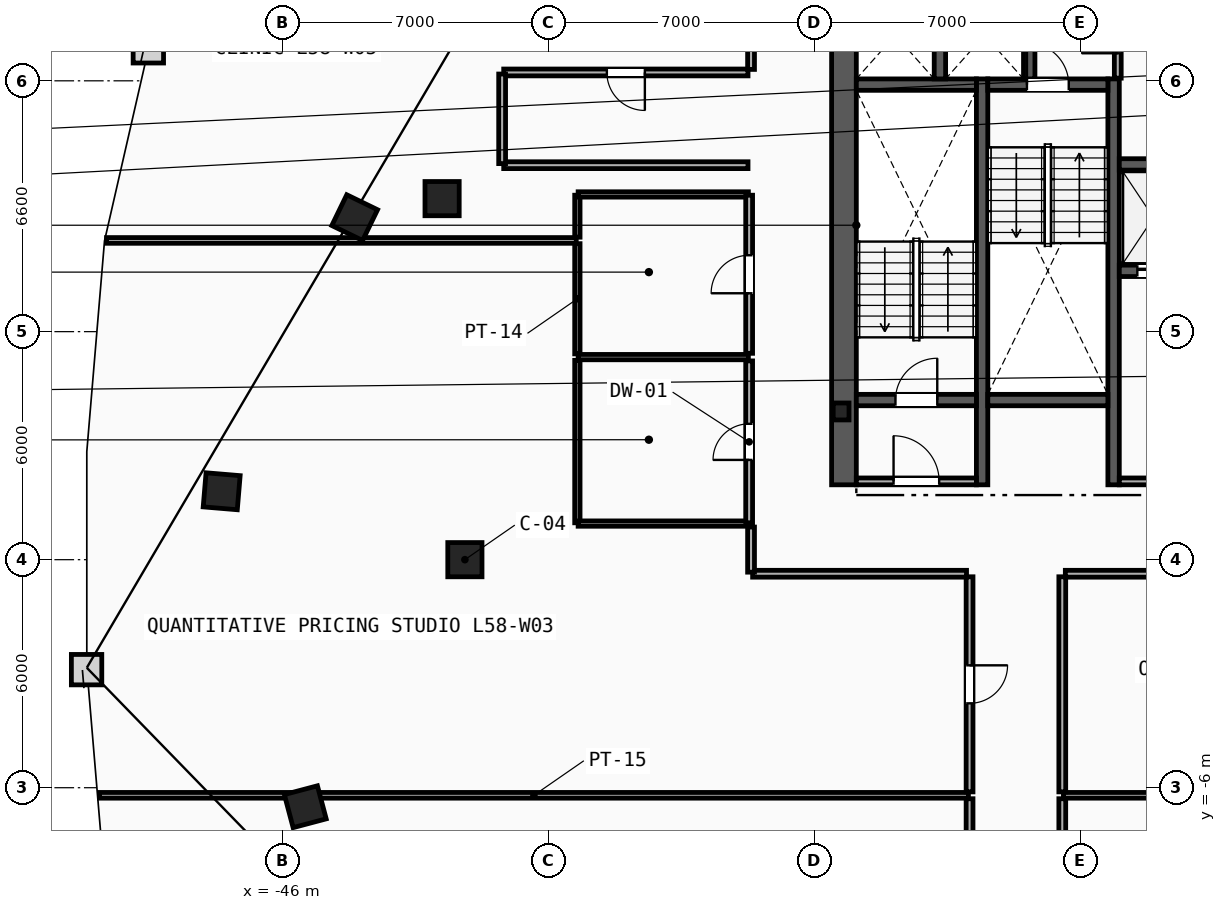
"""IFC4 building model, lengths in metres.
Left out: names, types, materials, properties, quantities, classifications, styles, units other than length and angle.
Written with IfcOpenShell. Run it as: python <this file> out.ifc"""

import sys

from ifc_helpers import new_model, si_unit, direction, frame, frame_2d, origin, origin_2d, place, context, subcontext, project, spatial, rectangle, i_section, extrude, element, fill, save


model = new_model("IFC4")
c1 = context("Model", 3, precision=1e-05, world=origin(), true_north=direction((0.0, 1.0)))
c2 = subcontext(c1, "Body", "Model", "MODEL_VIEW")
j1 = project(units=[si_unit("LENGTHUNIT", "METRE"), si_unit("PLANEANGLEUNIT", "RADIAN")], contexts=[c1])
p1 = place(None, origin())
s1 = spatial("IfcSite", under=j1, at=p1, CompositionType="ELEMENT")
p2 = place(p1, origin())
s2 = spatial("IfcBuilding", under=s1, at=p2, CompositionType="ELEMENT")
p3 = place(p2, frame((0.0, 0.0, 220.6)))
s3 = spatial("IfcBuildingStorey", under=s2, at=p3, CompositionType="ELEMENT", Elevation=220.6)
p4 = place(p3, frame((-31.3, 3.9, 0.0), z_axis=(0.0, 0.0, 1.0), x_axis=(1.0, 0.0, 0.0)))
e1 = element("IfcColumn", 1, at=p4, inside=s3, PredefinedType="COLUMN", context=c2, shape_type="SweptSolid", body=[
    extrude(i_section(OverallWidth=0.416, OverallDepth=0.446, WebThickness=0.039, FlangeThickness=0.063, FilletRadius=0.018, at=origin_2d()), origin(), (0.0, 0.0, 1.0), 3.6),
])
for number, where, z_axis, x_axis in (
    (2, (-41.2, 0.0, 0.0), (0.0, 0.0, 1.0), (1.0, 0.0, 0.0)),
    (3, (-41.8, 9.5, 0.0), (0.0, 0.0, 1.0), (1.0, 0.0, 0.0)),
    (4, (-44.1, 9.0, 0.0), (0.0, 0.0, 1.0), (-0.437, -0.899, 0.0)),
    (5, (-47.6, 1.8, 0.0), (0.0, 0.0, 1.0), (-0.084, -0.997, 0.0)),
    (6, (-45.4, -6.5, 0.0), (0.0, 0.0, 1.0), (0.256, -0.967, 0.0)),
):
    element("IfcColumn", number, at=place(p3, frame(where, z_axis=z_axis, x_axis=x_axis)), inside=s3, PredefinedType="COLUMN", context=c2, shape_type="SweptSolid", body=[
        extrude(rectangle(XDim=0.9, YDim=0.9, at=origin_2d()), origin(), (0.0, 0.0, 1.0), 3.6),
    ])
p5 = place(p3, frame((-31.225, 1.97, 0.0), z_axis=(0.0, 0.0, 1.0), x_axis=(0.0, 1.0, 0.0)))
e7 = element("IfcWall", 7, at=p5, inside=s3, PredefinedType="SHEAR", context=c2, shape_type="SweptSolid", body=[
    extrude(rectangle(XDim=13.33, YDim=0.65, at=frame_2d((6.665, 0.0))), origin(), (0.0, 0.0, 1.0), 3.34),
])
for number, where, z_axis, x_axis in (
    (8, (-27.59, 1.97, 0.0), (0.0, 0.0, 1.0), (0.0, 1.0, 0.0)),
    (9, (-24.13, 1.97, 0.0), (0.0, 0.0, 1.0), (0.0, 1.0, 0.0)),
):
    element("IfcWall", number, at=place(p3, frame(where, z_axis=z_axis, x_axis=x_axis)), inside=s3, PredefinedType="SHEAR", context=c2, shape_type="SweptSolid", body=[
        extrude(rectangle(XDim=10.68, YDim=0.3, at=frame_2d((5.34, 0.0))), origin(), (0.0, 0.0, 1.0), 3.34),
    ])
p6 = place(p3, frame((-30.9, 4.2, 0.0), z_axis=(0.0, 0.0, 1.0), x_axis=(1.0, 0.0, 0.0)))
e10 = element("IfcWall", 10, at=p6, inside=s3, PredefinedType="SHEAR", context=c2, shape_type="SweptSolid", body=[
    extrude(rectangle(XDim=3.16, YDim=0.3, at=frame_2d((1.58, 0.0))), origin(), (0.0, 0.0, 1.0), 3.34),
])
p7 = place(p6, frame((1.03, 0.0, 0.0)))
e11 = element("IfcOpeningElement", 11, at=p7, cuts=e10, PredefinedType="OPENING", context=c2, shape_type="SweptSolid", body=[
    extrude(rectangle(XDim=1.1, YDim=2.15, at=frame_2d((0.55, 1.075))), frame((0.0, 0.16, 0.0), z_axis=(0.0, -1.0, 0.0), x_axis=(1.0, 0.0, 0.0)), (0.0, 0.0, 1.0), 0.32),
])
p8 = place(p3, frame((-30.9, 12.5, 0.0), z_axis=(0.0, 0.0, 1.0), x_axis=(1.0, 0.0, 0.0)))
e12 = element("IfcWall", 12, at=p8, inside=s3, PredefinedType="SHEAR", context=c2, shape_type="SweptSolid", body=[
    extrude(rectangle(XDim=3.16, YDim=0.3, at=frame_2d((1.58, 0.0))), origin(), (0.0, 0.0, 1.0), 3.34),
])
p9 = place(p3, frame((-27.44, 12.5, 0.0), z_axis=(0.0, 0.0, 1.0), x_axis=(1.0, 0.0, 0.0)))
e13 = element("IfcWall", 13, at=p9, inside=s3, PredefinedType="SHEAR", context=c2, shape_type="SweptSolid", body=[
    extrude(rectangle(XDim=3.16, YDim=0.3, at=frame_2d((1.58, 0.0))), origin(), (0.0, 0.0, 1.0), 3.34),
])
p10 = place(p9, frame((1.03, 0.0, 0.0)))
e14 = element("IfcOpeningElement", 14, at=p10, cuts=e13, PredefinedType="OPENING", context=c2, shape_type="SweptSolid", body=[
    extrude(rectangle(XDim=1.1, YDim=2.15, at=frame_2d((0.55, 1.075))), frame((0.0, 0.16, 0.0), z_axis=(0.0, -1.0, 0.0), x_axis=(1.0, 0.0, 0.0)), (0.0, 0.0, 1.0), 0.32),
])
p11 = place(p3, frame((-27.44, 4.2, 0.0), z_axis=(0.0, 0.0, 1.0), x_axis=(1.0, 0.0, 0.0)))
e15 = element("IfcWall", 15, at=p11, inside=s3, PredefinedType="SHEAR", context=c2, shape_type="SweptSolid", body=[
    extrude(rectangle(XDim=3.16, YDim=0.3, at=frame_2d((1.58, 0.0))), origin(), (0.0, 0.0, 1.0), 3.34),
])
p12 = place(p3, frame((-23.98, 2.06, 0.0), z_axis=(0.0, 0.0, 1.0), x_axis=(1.0, 0.0, 0.0)))
e16 = element("IfcWall", 16, at=p12, inside=s3, PredefinedType="PARTITIONING", context=c2, shape_type="SweptSolid", body=[
    extrude(rectangle(XDim=3.0, YDim=0.18, at=frame_2d((1.5, 0.0))), origin(), (0.0, 0.0, 1.0), 3.34),
])
p13 = place(p12, frame((0.9, 0.0, 0.0)))
e17 = element("IfcOpeningElement", 17, at=p13, cuts=e16, PredefinedType="OPENING", context=c2, shape_type="SweptSolid", body=[
    extrude(rectangle(XDim=1.2, YDim=2.15, at=frame_2d((0.6, 1.075))), frame((0.0, 0.1, 0.0), z_axis=(0.0, -1.0, 0.0), x_axis=(1.0, 0.0, 0.0)), (0.0, 0.0, 1.0), 0.2),
])
p14 = place(p3, frame((-30.9, 2.06, 0.0), z_axis=(0.0, 0.0, 1.0), x_axis=(1.0, 0.0, 0.0)))
e18 = element("IfcWall", 18, at=p14, inside=s3, PredefinedType="PARTITIONING", context=c2, shape_type="SweptSolid", body=[
    extrude(rectangle(XDim=3.16, YDim=0.18, at=frame_2d((1.58, 0.0))), origin(), (0.0, 0.0, 1.0), 3.34),
])
p15 = place(p14, frame((0.98, 0.0, 0.0)))
e19 = element("IfcOpeningElement", 19, at=p15, cuts=e18, PredefinedType="OPENING", context=c2, shape_type="SweptSolid", body=[
    extrude(rectangle(XDim=1.2, YDim=2.15, at=frame_2d((0.6, 1.075))), frame((0.0, 0.1, 0.0), z_axis=(0.0, -1.0, 0.0), x_axis=(1.0, 0.0, 0.0)), (0.0, 0.0, 1.0), 0.2),
])
p16 = place(p3, frame((-23.98, 7.6, 0.0), z_axis=(0.0, 0.0, 1.0), x_axis=(1.0, 0.0, 0.0)))
e20 = element("IfcWall", 20, at=p16, inside=s3, PredefinedType="SHEAR", context=c2, shape_type="SweptSolid", body=[
    extrude(rectangle(XDim=2.1, YDim=0.3, at=frame_2d((1.05, 0.0))), origin(), (0.0, 0.0, 1.0), 3.34),
])
p17 = place(p16, frame((0.475, 0.0, 0.0)))
e21 = element("IfcOpeningElement", 21, at=p17, cuts=e20, PredefinedType="OPENING", context=c2, shape_type="SweptSolid", body=[
    extrude(rectangle(XDim=1.15, YDim=2.2, at=frame_2d((0.575, 1.1))), frame((0.0, 0.16, 0.0), z_axis=(0.0, -1.0, 0.0), x_axis=(1.0, 0.0, 0.0)), (0.0, 0.0, 1.0), 0.32),
])
p18 = place(p3, frame((-23.98, 10.4, 0.0), z_axis=(0.0, 0.0, 1.0), x_axis=(1.0, 0.0, 0.0)))
e22 = element("IfcWall", 22, at=p18, inside=s3, PredefinedType="SHEAR", context=c2, shape_type="SweptSolid", body=[
    extrude(rectangle(XDim=2.1, YDim=0.3, at=frame_2d((1.05, 0.0))), origin(), (0.0, 0.0, 1.0), 3.34),
])
for number, where, z_axis, x_axis in (
    (23, (-28.7, 12.65, 0.0), (0.0, 0.0, 1.0), (0.0, 1.0, 0.0)),
    (24, (-26.35, 12.65, 0.0), (0.0, 0.0, 1.0), (0.0, 1.0, 0.0)),
):
    element("IfcWall", number, at=place(p3, frame(where, z_axis=z_axis, x_axis=x_axis)), inside=s3, PredefinedType="SHEAR", context=c2, shape_type="SweptSolid", body=[
        extrude(rectangle(XDim=2.3, YDim=0.3, at=frame_2d((1.15, 0.0))), origin(), (0.0, 0.0, 1.0), 3.34),
    ])
p19 = place(p3, frame((-24.02, 12.67, 0.0), z_axis=(0.0, 0.0, 1.0), x_axis=(0.0, 1.0, 0.0)))
e25 = element("IfcWall", 25, at=p19, inside=s3, PredefinedType="PARTITIONING", context=c2, shape_type="SweptSolid", body=[
    extrude(rectangle(XDim=2.26, YDim=0.18, at=frame_2d((1.13, 0.0))), origin(), (0.0, 0.0, 1.0), 3.34),
])
p20 = place(p19, frame((0.655, 0.0, 0.0)))
e26 = element("IfcOpeningElement", 26, at=p20, cuts=e25, PredefinedType="OPENING", context=c2, shape_type="SweptSolid", body=[
    extrude(rectangle(XDim=0.95, YDim=2.1, at=frame_2d((0.475, 1.05))), frame((0.0, 0.1, 0.0), z_axis=(0.0, -1.0, 0.0), x_axis=(1.0, 0.0, 0.0)), (0.0, 0.0, 1.0), 0.2),
])
p21 = place(p3, frame((-38.24, 0.97, 0.0), z_axis=(0.0, 0.0, 1.0), x_axis=(0.0, 1.0, 0.0)))
e27 = element("IfcWall", 27, at=p21, inside=s3, PredefinedType="PARTITIONING", context=c2, shape_type="SweptSolid", body=[
    extrude(rectangle(XDim=4.275, YDim=0.14, at=frame_2d((2.138, 0.0))), origin(), (0.0, 0.0, 1.0), 3.34),
])
p22 = place(p3, frame((-38.24, 5.415, 0.0), z_axis=(0.0, 0.0, 1.0), x_axis=(0.0, 1.0, 0.0)))
e28 = element("IfcWall", 28, at=p22, inside=s3, PredefinedType="PARTITIONING", context=c2, shape_type="SweptSolid", body=[
    extrude(rectangle(XDim=2.9, YDim=0.14, at=frame_2d((1.45, 0.0))), origin(), (0.0, 0.0, 1.0), 3.34),
])
p23 = place(p3, frame((-38.24, 8.485, 0.0), z_axis=(0.0, 0.0, 1.0), x_axis=(0.0, 1.0, 0.0)))
e29 = element("IfcWall", 29, at=p23, inside=s3, PredefinedType="PARTITIONING", context=c2, shape_type="SweptSolid", body=[
    extrude(rectangle(XDim=1.105, YDim=0.14, at=frame_2d((0.552, 0.0))), origin(), (0.0, 0.0, 1.0), 3.34),
])
for number, where, z_axis, x_axis in (
    (30, (-38.22, 0.95, 0.0), (0.0, 0.0, 1.0), (1.0, 0.0, 0.0)),
    (31, (-38.22, 5.33, 0.0), (0.0, 0.0, 1.0), (1.0, 0.0, 0.0)),
    (32, (-38.22, 9.61, 0.0), (0.0, 0.0, 1.0), (1.0, 0.0, 0.0)),
):
    element("IfcWall", number, at=place(p3, frame(where, z_axis=z_axis, x_axis=x_axis)), inside=s3, PredefinedType="PARTITIONING", context=c2, shape_type="SweptSolid", body=[
        extrude(rectangle(XDim=4.48, YDim=0.14, at=frame_2d((2.24, 0.0))), origin(), (0.0, 0.0, 1.0), 3.34),
    ])
p24 = place(p3, frame((-33.72, 0.97, 0.0), z_axis=(0.0, 0.0, 1.0), x_axis=(0.0, 1.0, 0.0)))
e33 = element("IfcWall", 33, at=p24, inside=s3, PredefinedType="PARTITIONING", context=c2, shape_type="SweptSolid", body=[
    extrude(rectangle(XDim=4.26, YDim=0.18, at=frame_2d((2.13, 0.0))), origin(), (0.0, 0.0, 1.0), 3.34),
])
p25 = place(p24, frame((1.655, 0.0, 0.0)))
e34 = element("IfcOpeningElement", 34, at=p25, cuts=e33, PredefinedType="OPENING", context=c2, shape_type="SweptSolid", body=[
    extrude(rectangle(XDim=0.95, YDim=2.1, at=frame_2d((0.475, 1.05))), frame((0.0, 0.1, 0.0), z_axis=(0.0, -1.0, 0.0), x_axis=(1.0, 0.0, 0.0)), (0.0, 0.0, 1.0), 0.2),
])
p26 = place(p3, frame((-33.72, 5.43, 0.0), z_axis=(0.0, 0.0, 1.0), x_axis=(0.0, 1.0, 0.0)))
e35 = element("IfcWall", 35, at=p26, inside=s3, PredefinedType="PARTITIONING", context=c2, shape_type="SweptSolid", body=[
    extrude(rectangle(XDim=4.16, YDim=0.18, at=frame_2d((2.08, 0.0))), origin(), (0.0, 0.0, 1.0), 3.34),
])
p27 = place(p26, frame((1.58, 0.0, 0.0)))
e36 = element("IfcOpeningElement", 36, at=p27, cuts=e35, PredefinedType="OPENING", context=c2, shape_type="SweptSolid", body=[
    extrude(rectangle(XDim=1.0, YDim=2.15, at=frame_2d((0.5, 1.075))), frame((0.0, 0.1, 0.0), z_axis=(0.0, -1.0, 0.0), x_axis=(1.0, 0.0, 0.0)), (0.0, 0.0, 1.0), 0.2),
])
p28 = place(p3, frame((-50.817, -6.2, 0.0), z_axis=(0.0, 0.0, 1.0), x_axis=(1.0, 0.0, 0.0)))
e37 = element("IfcWall", 37, at=p28, inside=s3, PredefinedType="PARTITIONING", context=c2, shape_type="SweptSolid", body=[
    extrude(rectangle(XDim=22.867, YDim=0.15, at=frame_2d((11.434, 0.0))), origin(), (0.0, 0.0, 1.0), 3.34),
])
p29 = place(p3, frame((-25.45, -6.2, 0.0), z_axis=(0.0, 0.0, 1.0), x_axis=(1.0, 0.0, 0.0)))
e38 = element("IfcWall", 38, at=p29, inside=s3, PredefinedType="PARTITIONING", context=c2, shape_type="SweptSolid", body=[
    extrude(rectangle(XDim=12.267, YDim=0.15, at=frame_2d((6.133, 0.0))), origin(), (0.0, 0.0, 1.0), 3.34),
])
p30 = place(p3, frame((-50.63, 8.4, 0.0), z_axis=(0.0, 0.0, 1.0), x_axis=(1.0, 0.0, 0.0)))
e39 = element("IfcWall", 39, at=p30, inside=s3, PredefinedType="PARTITIONING", context=c2, shape_type="SweptSolid", body=[
    extrude(rectangle(XDim=12.36, YDim=0.15, at=frame_2d((6.18, 0.0))), origin(), (0.0, 0.0, 1.0), 3.34),
])
p31 = place(p3, frame((-27.92, -6.29, 0.0), z_axis=(0.0, 0.0, 1.0), x_axis=(0.0, -1.0, 0.0)))
e40 = element("IfcWall", 40, at=p31, inside=s3, PredefinedType="PARTITIONING", context=c2, shape_type="SweptSolid", body=[
    extrude(rectangle(XDim=4.888, YDim=0.18, at=frame_2d((2.444, 0.0))), origin(), (0.0, 0.0, 1.0), 3.34),
])
p32 = place(p31, frame((1.944, 0.0, 0.0)))
e41 = element("IfcOpeningElement", 41, at=p32, cuts=e40, PredefinedType="OPENING", context=c2, shape_type="SweptSolid", body=[
    extrude(rectangle(XDim=1.0, YDim=2.15, at=frame_2d((0.5, 1.075))), frame((0.0, 0.1, 0.0), z_axis=(0.0, -1.0, 0.0), x_axis=(1.0, 0.0, 0.0)), (0.0, 0.0, 1.0), 0.2),
])
p33 = place(p3, frame((-25.48, -11.178, 0.0), z_axis=(0.0, 0.0, 1.0), x_axis=(0.0, 1.0, 0.0)))
e42 = element("IfcWall", 42, at=p33, inside=s3, PredefinedType="PARTITIONING", context=c2, shape_type="SweptSolid", body=[
    extrude(rectangle(XDim=4.888, YDim=0.18, at=frame_2d((2.444, 0.0))), origin(), (0.0, 0.0, 1.0), 3.34),
])
p34 = place(p3, frame((-27.92, -0.45, 0.0), z_axis=(0.0, 0.0, 1.0), x_axis=(0.0, -1.0, 0.0)))
e43 = element("IfcWall", 43, at=p34, inside=s3, PredefinedType="PARTITIONING", context=c2, shape_type="SweptSolid", body=[
    extrude(rectangle(XDim=5.66, YDim=0.18, at=frame_2d((2.83, 0.0))), origin(), (0.0, 0.0, 1.0), 3.34),
])
p35 = place(p34, frame((2.33, 0.0, 0.0)))
e44 = element("IfcOpeningElement", 44, at=p35, cuts=e43, PredefinedType="OPENING", context=c2, shape_type="SweptSolid", body=[
    extrude(rectangle(XDim=1.0, YDim=2.15, at=frame_2d((0.5, 1.075))), frame((0.0, 0.1, 0.0), z_axis=(0.0, -1.0, 0.0), x_axis=(1.0, 0.0, 0.0)), (0.0, 0.0, 1.0), 0.2),
])
p36 = place(p3, frame((-33.628, -0.37, 0.0), z_axis=(0.0, 0.0, 1.0), x_axis=(1.0, 0.0, 0.0)))
e45 = element("IfcWall", 45, at=p36, inside=s3, PredefinedType="PARTITIONING", context=c2, shape_type="SweptSolid", body=[
    extrude(rectangle(XDim=5.628, YDim=0.18, at=frame_2d((2.814, 0.0))), origin(), (0.0, 0.0, 1.0), 3.34),
])
p37 = place(p3, frame((-33.67, 0.859, 0.0), z_axis=(0.0, 0.0, 1.0), x_axis=(0.0, -1.0, 0.0)))
e46 = element("IfcWall", 46, at=p37, inside=s3, PredefinedType="PARTITIONING", context=c2, shape_type="SweptSolid", body=[
    extrude(rectangle(XDim=1.187, YDim=0.18, at=frame_2d((0.594, 0.0))), origin(), (0.0, 0.0, 1.0), 3.34),
])
p38 = place(p3, frame((-25.4, -0.37, 0.0), z_axis=(0.0, 0.0, 1.0), x_axis=(1.0, 0.0, 0.0)))
e47 = element("IfcWall", 47, at=p38, inside=s3, PredefinedType="PARTITIONING", context=c2, shape_type="SweptSolid", body=[
    extrude(rectangle(XDim=8.578, YDim=0.18, at=frame_2d((4.289, 0.0))), origin(), (0.0, 0.0, 1.0), 3.34),
])
p39 = place(p38, frame((3.789, 0.0, 0.0)))
e48 = element("IfcOpeningElement", 48, at=p39, cuts=e47, PredefinedType="OPENING", context=c2, shape_type="SweptSolid", body=[
    extrude(rectangle(XDim=1.0, YDim=2.15, at=frame_2d((0.5, 1.075))), frame((0.0, 0.1, 0.0), z_axis=(0.0, -1.0, 0.0), x_axis=(1.0, 0.0, 0.0)), (0.0, 0.0, 1.0), 0.2),
])
p40 = place(p3, frame((-25.48, -6.11, 0.0), z_axis=(0.0, 0.0, 1.0), x_axis=(0.0, 1.0, 0.0)))
e49 = element("IfcWall", 49, at=p40, inside=s3, PredefinedType="PARTITIONING", context=c2, shape_type="SweptSolid", body=[
    extrude(rectangle(XDim=5.66, YDim=0.18, at=frame_2d((2.83, 0.0))), origin(), (0.0, 0.0, 1.0), 3.34),
])
p41 = place(p3, frame((-33.75, 12.82, 0.0), z_axis=(0.0, 0.0, 1.0), x_axis=(-1.0, 0.0, 0.0)))
e50 = element("IfcWall", 50, at=p41, inside=s3, PredefinedType="PARTITIONING", context=c2, shape_type="SweptSolid", body=[
    extrude(rectangle(XDim=6.428, YDim=0.18, at=frame_2d((3.214, 0.0))), origin(), (0.0, 0.0, 1.0), 3.34),
])
p42 = place(p41, frame((2.714, 0.0, 0.0)))
e51 = element("IfcOpeningElement", 51, at=p42, cuts=e50, PredefinedType="OPENING", context=c2, shape_type="SweptSolid", body=[
    extrude(rectangle(XDim=1.0, YDim=2.15, at=frame_2d((0.5, 1.075))), frame((0.0, 0.1, 0.0), z_axis=(0.0, -1.0, 0.0), x_axis=(1.0, 0.0, 0.0)), (0.0, 0.0, 1.0), 0.2),
])
p43 = place(p3, frame((-40.178, 10.38, 0.0), z_axis=(0.0, 0.0, 1.0), x_axis=(1.0, 0.0, 0.0)))
e52 = element("IfcWall", 52, at=p43, inside=s3, PredefinedType="PARTITIONING", context=c2, shape_type="SweptSolid", body=[
    extrude(rectangle(XDim=6.428, YDim=0.18, at=frame_2d((3.214, 0.0))), origin(), (0.0, 0.0, 1.0), 3.34),
])
p44 = place(p3, frame((-33.67, 17.428, 0.0), z_axis=(0.0, 0.0, 1.0), x_axis=(0.0, -1.0, 0.0)))
e53 = element("IfcWall", 53, at=p44, inside=s3, PredefinedType="PARTITIONING", context=c2, shape_type="SweptSolid", body=[
    extrude(rectangle(XDim=4.529, YDim=0.18, at=frame_2d((2.264, 0.0))), origin(), (0.0, 0.0, 1.0), 3.34),
])
p45 = place(p3, frame((-40.22, 12.779, 0.0), z_axis=(0.0, 0.0, 1.0), x_axis=(0.0, -1.0, 0.0)))
e54 = element("IfcWall", 54, at=p45, inside=s3, PredefinedType="PARTITIONING", context=c2, shape_type="SweptSolid", body=[
    extrude(rectangle(XDim=2.357, YDim=0.18, at=frame_2d((1.179, 0.0))), origin(), (0.0, 0.0, 1.0), 3.34),
])
p46 = place(p7, origin())
e55 = element("IfcDoor", 55, at=p46, inside=s3, OperationType="SINGLE_SWING_RIGHT", PredefinedType="DOOR", context=c2, shape_type="SweptSolid", body=[
    extrude(rectangle(XDim=1.1, YDim=2.15, at=frame_2d((0.55, 1.075))), frame((0.0, 0.025, 0.0), z_axis=(0.0, -1.0, 0.0), x_axis=(1.0, 0.0, 0.0)), (0.0, 0.0, 1.0), 0.05),
])
fill(e11, e55)
p47 = place(p10, origin())
e56 = element("IfcDoor", 56, at=p47, inside=s3, OperationType="SINGLE_SWING_LEFT", PredefinedType="DOOR", context=c2, shape_type="SweptSolid", body=[
    extrude(rectangle(XDim=1.1, YDim=2.15, at=frame_2d((0.55, 1.075))), frame((0.0, 0.025, 0.0), z_axis=(0.0, -1.0, 0.0), x_axis=(1.0, 0.0, 0.0)), (0.0, 0.0, 1.0), 0.05),
])
fill(e14, e56)
p48 = place(p15, origin())
e57 = element("IfcDoor", 57, at=p48, inside=s3, OperationType="SINGLE_SWING_LEFT", PredefinedType="DOOR", context=c2, shape_type="SweptSolid", body=[
    extrude(rectangle(XDim=1.2, YDim=2.15, at=frame_2d((0.6, 1.075))), frame((0.0, 0.025, 0.0), z_axis=(0.0, -1.0, 0.0), x_axis=(1.0, 0.0, 0.0)), (0.0, 0.0, 1.0), 0.05),
])
fill(e19, e57)
p49 = place(p17, origin())
e58 = element("IfcDoor", 58, at=p49, inside=s3, OperationType="SLIDING_TO_LEFT", PredefinedType="TRAPDOOR", context=c2, shape_type="SweptSolid", body=[
    extrude(rectangle(XDim=1.15, YDim=2.2, at=frame_2d((0.575, 1.1))), frame((0.0, 0.025, 0.0), z_axis=(0.0, -1.0, 0.0), x_axis=(1.0, 0.0, 0.0)), (0.0, 0.0, 1.0), 0.05),
])
fill(e21, e58)
p50 = place(p42, origin())
e59 = element("IfcDoor", 59, at=p50, inside=s3, OperationType="SINGLE_SWING_LEFT", PredefinedType="DOOR", context=c2, shape_type="SweptSolid", body=[
    extrude(rectangle(XDim=1.0, YDim=2.15, at=frame_2d((0.5, 1.075))), frame((0.0, 0.025, 0.0), z_axis=(0.0, -1.0, 0.0), x_axis=(1.0, 0.0, 0.0)), (0.0, 0.0, 1.0), 0.05),
])
fill(e51, e59)
p51 = place(p35, origin())
e60 = element("IfcDoor", 60, at=p51, inside=s3, OperationType="SINGLE_SWING_LEFT", PredefinedType="DOOR", context=c2, shape_type="SweptSolid", body=[
    extrude(rectangle(XDim=1.0, YDim=2.15, at=frame_2d((0.5, 1.075))), frame((0.0, 0.025, 0.0), z_axis=(0.0, -1.0, 0.0), x_axis=(1.0, 0.0, 0.0)), (0.0, 0.0, 1.0), 0.05),
])
fill(e44, e60)
p52 = place(p25, origin())
e61 = element("IfcDoor", 61, at=p52, inside=s3, OperationType="SINGLE_SWING_LEFT", PredefinedType="DOOR", context=c2, shape_type="SweptSolid", body=[
    extrude(rectangle(XDim=0.95, YDim=2.1, at=frame_2d((0.475, 1.05))), frame((0.0, 0.025, 0.0), z_axis=(0.0, -1.0, 0.0), x_axis=(1.0, 0.0, 0.0)), (0.0, 0.0, 1.0), 0.05),
])
fill(e34, e61)
p53 = place(p27, origin())
e62 = element("IfcDoor", 62, at=p53, inside=s3, OperationType="SINGLE_SWING_LEFT", PredefinedType="DOOR", context=c2, shape_type="SweptSolid", body=[
    extrude(rectangle(XDim=1.0, YDim=2.15, at=frame_2d((0.5, 1.075))), frame((0.0, 0.025, 0.0), z_axis=(0.0, -1.0, 0.0), x_axis=(1.0, 0.0, 0.0)), (0.0, 0.0, 1.0), 0.05),
])
fill(e36, e62)
p54 = place(p20, origin())
e63 = element("IfcDoor", 63, at=p54, inside=s3, OperationType="SINGLE_SWING_LEFT", PredefinedType="DOOR", context=c2, shape_type="SweptSolid", body=[
    extrude(rectangle(XDim=0.95, YDim=2.1, at=frame_2d((0.475, 1.05))), frame((0.0, 0.025, 0.0), z_axis=(0.0, -1.0, 0.0), x_axis=(1.0, 0.0, 0.0)), (0.0, 0.0, 1.0), 0.05),
])
fill(e26, e63)
save(model, sys.argv[1])
